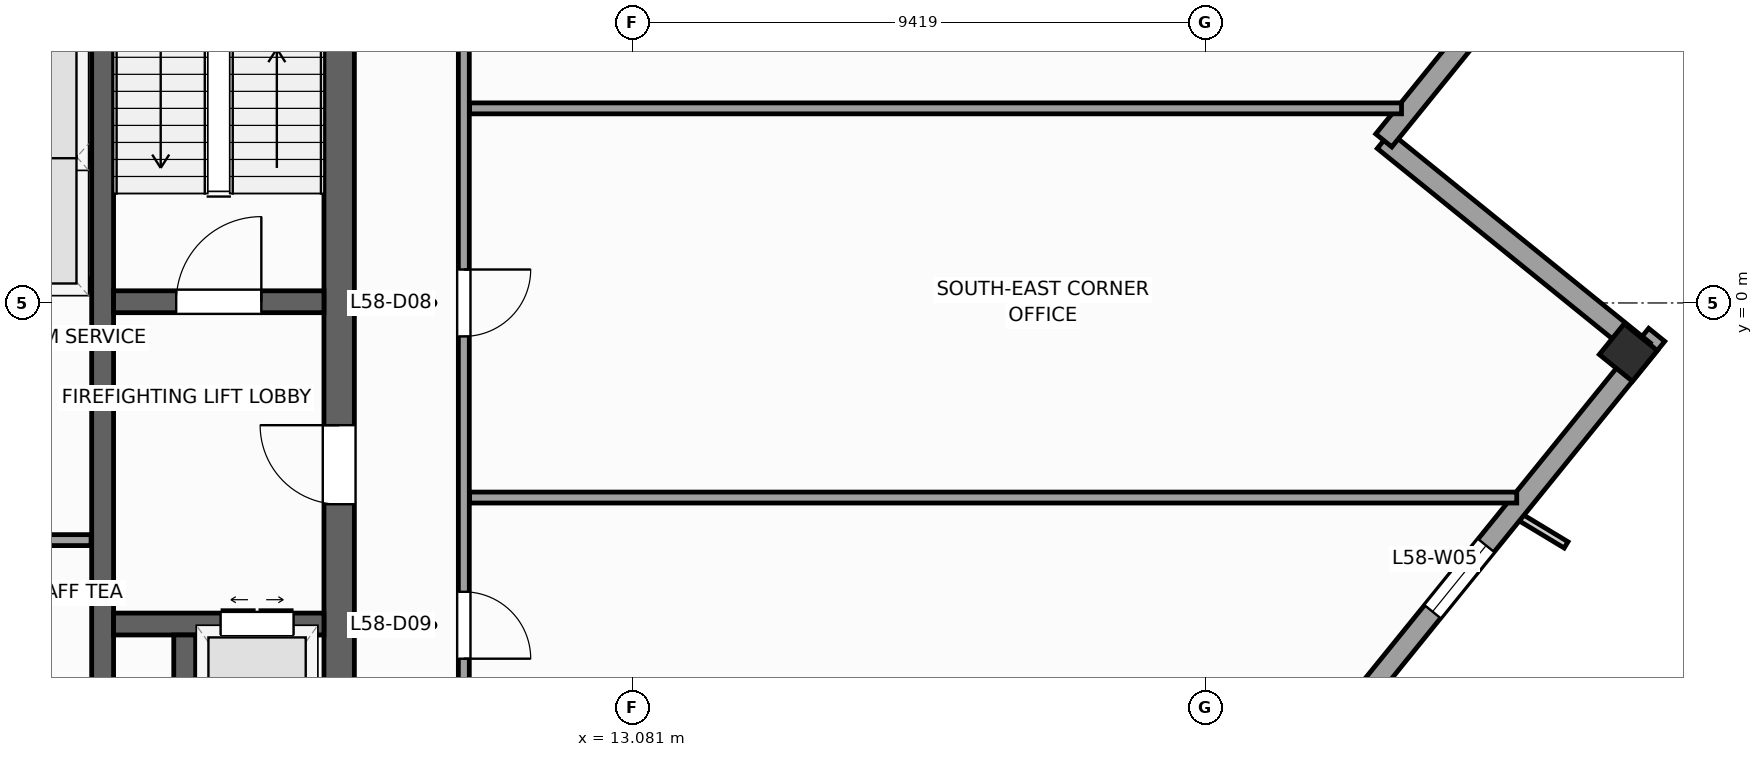
"""IFC4 building model, lengths in metres.
Left out: names, types, materials, properties, quantities, classifications, styles, units other than length and angle.
Written with IfcOpenShell. Run it as: python <this file> out.ifc"""

import sys

from ifc_helpers import new_model, si_unit, direction, frame, frame_2d, origin, origin_2d, place, context, subcontext, project, spatial, rectangle, extrude, source, transform, mapped, element, fill, save


model = new_model("IFC4")
c1 = context("Model", 3, precision=1e-05, world=origin(), true_north=direction((0.0, 1.0)))
c2 = subcontext(c1, "Body", "Model", "MODEL_VIEW")
j1 = project(units=[si_unit("LENGTHUNIT", "METRE"), si_unit("PLANEANGLEUNIT", "RADIAN")], contexts=[c1])
p1 = place(None, origin())
s1 = spatial("IfcSite", under=j1, at=p1, CompositionType="ELEMENT")
p2 = place(p1, origin())
s2 = spatial("IfcBuilding", under=s1, at=p2, CompositionType="ELEMENT")
p3 = place(p2, frame((0.0, 0.0, 240.7)))
s3 = spatial("IfcBuildingStorey", under=s2, at=p3, CompositionType="ELEMENT", Elevation=240.7)
p4 = place(p3, frame((8.25, -8.0, 0.0), z_axis=(0.0, 0.0, 1.0), x_axis=(0.0, 1.0, 0.0)))
e1 = element("IfcWall", 1, at=p4, inside=s3, PredefinedType="SHEAR", context=c2, shape_type="SweptSolid", body=[
    extrude(rectangle(XDim=16.0, YDim=0.5, at=frame_2d((8.0, 0.0))), origin(), (0.0, 0.0, 1.0), 3.9),
])
p5 = place(p4, frame((4.69, 0.0, 0.0)))
e2 = element("IfcOpeningElement", 2, at=p5, cuts=e1, PredefinedType="OPENING", context=c2, shape_type="SweptSolid", body=[
    extrude(rectangle(XDim=1.3, YDim=2.2, at=frame_2d((0.65, 1.1))), frame((0.0, 0.26, 0.0), z_axis=(0.0, -1.0, 0.0), x_axis=(1.0, 0.0, 0.0)), (0.0, 0.0, 1.0), 0.52),
])
p6 = place(p3, frame((4.36, -8.0, 0.0), z_axis=(0.0, 0.0, 1.0), x_axis=(0.0, 1.0, 0.0)))
e3 = element("IfcWall", 3, at=p6, inside=s3, PredefinedType="SHEAR", context=c2, shape_type="SweptSolid", body=[
    extrude(rectangle(XDim=16.0, YDim=0.36, at=frame_2d((8.0, 0.0))), origin(), (0.0, 0.0, 1.0), 3.9),
])
p7 = place(p3, frame((4.54, 0.02, 0.0), z_axis=(0.0, 0.0, 1.0), x_axis=(1.0, 0.0, 0.0)))
e4 = element("IfcWall", 4, at=p7, inside=s3, PredefinedType="SHEAR", context=c2, shape_type="SweptSolid", body=[
    extrude(rectangle(XDim=3.46, YDim=0.36, at=frame_2d((1.73, 0.0))), origin(), (0.0, 0.0, 1.0), 3.9),
])
p8 = place(p7, frame((1.03, 0.0, 0.0)))
e5 = element("IfcOpeningElement", 5, at=p8, cuts=e4, PredefinedType="OPENING", context=c2, shape_type="SweptSolid", body=[
    extrude(rectangle(XDim=1.4, YDim=2.2, at=frame_2d((0.7, 1.1))), frame((0.0, 0.19, 0.0), z_axis=(0.0, -1.0, 0.0), x_axis=(1.0, 0.0, 0.0)), (0.0, 0.0, 1.0), 0.38),
])
p9 = place(p3, frame((4.54, -5.28, 0.0), z_axis=(0.0, 0.0, 1.0), x_axis=(1.0, 0.0, 0.0)))
e6 = element("IfcWall", 6, at=p9, inside=s3, PredefinedType="SHEAR", context=c2, shape_type="SweptSolid", body=[
    extrude(rectangle(XDim=3.46, YDim=0.36, at=frame_2d((1.73, 0.0))), origin(), (0.0, 0.0, 1.0), 3.9),
])
p10 = place(p9, frame((1.76, 0.0, 0.0)))
e7 = element("IfcOpeningElement", 7, at=p10, cuts=e6, PredefinedType="OPENING", context=c2, shape_type="SweptSolid", body=[
    extrude(rectangle(XDim=1.2, YDim=2.25, at=frame_2d((0.6, 1.125))), frame((0.0, 0.19, 0.0), z_axis=(0.0, -1.0, 0.0), x_axis=(1.0, 0.0, 0.0)), (0.0, 0.0, 1.0), 0.38),
])
p11 = place(p3, frame((5.71, -8.0, 0.0), z_axis=(0.0, 0.0, 1.0), x_axis=(0.0, 1.0, 0.0)))
e8 = element("IfcWall", 8, at=p11, inside=s3, PredefinedType="SHEAR", context=c2, shape_type="SweptSolid", body=[
    extrude(rectangle(XDim=2.54, YDim=0.36, at=frame_2d((1.27, 0.0))), origin(), (0.0, 0.0, 1.0), 3.9),
])
m1 = source(origin(), c2, "Body", "SweptSolid", [
    extrude(rectangle(XDim=0.65, YDim=0.7, at=origin_2d()), origin(), (0.0, 0.0, 1.0), 3.9),
])
p12 = place(p3, frame((29.45, -0.815, 0.0), z_axis=(0.0, 0.0, 1.0), x_axis=(0.62932039105, 0.777145961457, 0.0)))
e9 = element("IfcColumn", 9, at=p12, inside=s3, PredefinedType="COLUMN", context=c2, shape_type="MappedRepresentation", body=[
    mapped(m1, transform((0.0, 0.0, 0.0), scale=1.0)),
])
p13 = place(p3, frame((6.733, -29.154, 0.0), z_axis=(0.0, 0.0, 1.0), x_axis=(0.629325378072, 0.77714192302, 0.0)))
e10 = element("IfcWall", 10, at=p13, inside=s3, PredefinedType="STANDARD", context=c2, shape_type="SweptSolid", body=[
    extrude(rectangle(XDim=36.84, YDim=0.34, at=frame_2d((18.42, 0.0))), origin(), (0.0, 0.0, 1.0), 2.96),
])
p14 = place(p13, frame((3.721, 0.0, 0.48)))
e11 = element("IfcOpeningElement", 11, at=p14, cuts=e10, PredefinedType="OPENING", context=c2, shape_type="SweptSolid", body=[
    extrude(rectangle(XDim=1.4, YDim=2.4, at=frame_2d((0.7, 1.2))), frame((0.0, 0.18, 0.0), z_axis=(0.0, -1.0, 0.0), x_axis=(1.0, 0.0, 0.0)), (0.0, 0.0, 1.0), 0.36),
])
p15 = place(p13, frame((10.559, 0.0, 0.58)))
e12 = element("IfcOpeningElement", 12, at=p15, cuts=e10, PredefinedType="OPENING", context=c2, shape_type="SweptSolid", body=[
    extrude(rectangle(XDim=1.75, YDim=2.3, at=frame_2d((0.875, 1.15))), frame((0.0, 0.18, 0.0), z_axis=(0.0, -1.0, 0.0), x_axis=(1.0, 0.0, 0.0)), (0.0, 0.0, 1.0), 0.36),
])
p16 = place(p13, frame((16.058, 0.0, 0.58)))
e13 = element("IfcOpeningElement", 13, at=p16, cuts=e10, PredefinedType="OPENING", context=c2, shape_type="SweptSolid", body=[
    extrude(rectangle(XDim=1.75, YDim=2.3, at=frame_2d((0.875, 1.15))), frame((0.0, 0.18, 0.0), z_axis=(0.0, -1.0, 0.0), x_axis=(1.0, 0.0, 0.0)), (0.0, 0.0, 1.0), 0.36),
])
p17 = place(p13, frame((24.176, 0.0, 0.58)))
e14 = element("IfcOpeningElement", 14, at=p17, cuts=e10, PredefinedType="OPENING", context=c2, shape_type="SweptSolid", body=[
    extrude(rectangle(XDim=1.75, YDim=2.3, at=frame_2d((0.875, 1.15))), frame((0.0, 0.18, 0.0), z_axis=(0.0, -1.0, 0.0), x_axis=(1.0, 0.0, 0.0)), (0.0, 0.0, 1.0), 0.36),
])
p18 = place(p13, frame((30.982, 0.0, 0.48)))
e15 = element("IfcOpeningElement", 15, at=p18, cuts=e10, PredefinedType="OPENING", context=c2, shape_type="SweptSolid", body=[
    extrude(rectangle(XDim=1.4, YDim=2.4, at=frame_2d((0.7, 1.2))), frame((0.0, 0.18, 0.0), z_axis=(0.0, -1.0, 0.0), x_axis=(1.0, 0.0, 0.0)), (0.0, 0.0, 1.0), 0.36),
])
p19 = place(p3, frame((29.703, -0.789, 0.0), z_axis=(0.0, 0.0, 1.0), x_axis=(-0.77714355312, 0.629323365087, 0.0)))
e16 = element("IfcWall", 16, at=p19, inside=s3, PredefinedType="STANDARD", context=c2, shape_type="SweptSolid", body=[
    extrude(rectangle(XDim=5.5, YDim=0.34, at=frame_2d((2.75, 0.0))), origin(), (0.0, 0.0, 1.0), 3.66),
])
p20 = place(p3, frame((25.429, 2.673, 0.0), z_axis=(0.0, 0.0, 1.0), x_axis=(0.629299794138, 0.777162640055, 0.0)))
e17 = element("IfcWall", 17, at=p20, inside=s3, PredefinedType="STANDARD", context=c2, shape_type="SweptSolid", body=[
    extrude(rectangle(XDim=5.67, YDim=0.34, at=frame_2d((2.835, 0.0))), origin(), (0.0, 0.0, 1.0), 3.66),
])
p21 = place(p20, frame((2.135, 0.0, 0.48)))
e18 = element("IfcOpeningElement", 18, at=p21, cuts=e17, PredefinedType="OPENING", context=c2, shape_type="SweptSolid", body=[
    extrude(rectangle(XDim=1.4, YDim=2.4, at=frame_2d((0.7, 1.2))), frame((0.0, 0.18, 0.0), z_axis=(0.0, -1.0, 0.0), x_axis=(1.0, 0.0, 0.0)), (0.0, 0.0, 1.0), 0.36),
])
for number, where, z_axis, x_axis in (
    (19, (1.89, -3.9, 0.0), (0.0, 0.0, 1.0), (1.0, 0.0, 0.0)),
    (20, (1.89, 0.3, 0.0), (0.0, 0.0, 1.0), (1.0, 0.0, 0.0)),
):
    element("IfcWall", number, at=place(p3, frame(where, z_axis=z_axis, x_axis=x_axis)), inside=s3, PredefinedType="PARTITIONING", context=c2, shape_type="SweptSolid", body=[
        extrude(rectangle(XDim=2.28, YDim=0.18, at=frame_2d((1.14, 0.0))), origin(), (0.0, 0.0, 1.0), 3.66),
    ])
p22 = place(p3, frame((1.9, 2.4, 0.0), z_axis=(0.0, 0.0, 1.0), x_axis=(1.0, 0.0, 0.0)))
e21 = element("IfcWall", 21, at=p22, inside=s3, PredefinedType="PARTITIONING", context=c2, shape_type="SweptSolid", body=[
    extrude(rectangle(XDim=2.26, YDim=0.12, at=frame_2d((1.13, 0.0))), origin(), (0.0, 0.0, 1.0), 3.66),
])
p23 = place(p3, frame((10.3, -10.2, 0.0), z_axis=(0.0, 0.0, 1.0), x_axis=(0.0, 1.0, 0.0)))
e22 = element("IfcWall", 22, at=p23, inside=s3, PredefinedType="PARTITIONING", context=c2, shape_type="SweptSolid", body=[
    extrude(rectangle(XDim=20.4, YDim=0.18, at=frame_2d((10.2, 0.0))), origin(), (0.0, 0.0, 1.0), 3.66),
])
p24 = place(p23, frame((14.95, 0.0, 0.0)))
e23 = element("IfcOpeningElement", 23, at=p24, cuts=e22, PredefinedType="OPENING", context=c2, shape_type="SweptSolid", body=[
    extrude(rectangle(XDim=1.1, YDim=2.2, at=frame_2d((0.55, 1.1))), frame((0.0, 0.1, 0.0), z_axis=(0.0, -1.0, 0.0), x_axis=(1.0, 0.0, 0.0)), (0.0, 0.0, 1.0), 0.2),
])
p25 = place(p23, frame((9.65, 0.0, 0.0)))
e24 = element("IfcOpeningElement", 24, at=p25, cuts=e22, PredefinedType="OPENING", context=c2, shape_type="SweptSolid", body=[
    extrude(rectangle(XDim=1.1, YDim=2.2, at=frame_2d((0.55, 1.1))), frame((0.0, 0.1, 0.0), z_axis=(0.0, -1.0, 0.0), x_axis=(1.0, 0.0, 0.0)), (0.0, 0.0, 1.0), 0.2),
])
p26 = place(p23, frame((4.35, 0.0, 0.0)))
e25 = element("IfcOpeningElement", 25, at=p26, cuts=e22, PredefinedType="OPENING", context=c2, shape_type="SweptSolid", body=[
    extrude(rectangle(XDim=1.1, YDim=2.2, at=frame_2d((0.55, 1.1))), frame((0.0, 0.1, 0.0), z_axis=(0.0, -1.0, 0.0), x_axis=(1.0, 0.0, 0.0)), (0.0, 0.0, 1.0), 0.2),
])
p27 = place(p3, frame((10.395, 3.2, 0.0), z_axis=(0.0, 0.0, 1.0), x_axis=(1.0, 0.0, 0.0)))
e26 = element("IfcWall", 26, at=p27, inside=s3, PredefinedType="PARTITIONING", context=c2, shape_type="SweptSolid", body=[
    extrude(rectangle(XDim=15.326, YDim=0.18, at=frame_2d((7.663, 0.0))), origin(), (0.0, 0.0, 1.0), 3.66),
])
p28 = place(p3, frame((10.395, -3.2, 0.0), z_axis=(0.0, 0.0, 1.0), x_axis=(1.0, 0.0, 0.0)))
e27 = element("IfcWall", 27, at=p28, inside=s3, PredefinedType="PARTITIONING", context=c2, shape_type="SweptSolid", body=[
    extrude(rectangle(XDim=17.22, YDim=0.18, at=frame_2d((8.61, 0.0))), origin(), (0.0, 0.0, 1.0), 3.66),
])
m2 = source(origin(), c2, "Body", "SweptSolid", [
    extrude(rectangle(XDim=1.4, YDim=2.4, at=frame_2d((0.7, 1.2))), frame((0.0, 0.03, 0.0), z_axis=(0.0, -1.0, 0.0), x_axis=(1.0, 0.0, 0.0)), (0.0, 0.0, 1.0), 0.06),
])
p29 = place(p18, origin())
e28 = element("IfcWindow", 28, at=p29, inside=s3, PartitioningType="SINGLE_PANEL", PredefinedType="WINDOW", context=c2, shape_type="MappedRepresentation", body=[
    mapped(m2, transform((0.0, 0.0, 0.0), scale=1.0)),
])
fill(e15, e28)
m3 = source(origin(), c2, "Body", "SweptSolid", [
    extrude(rectangle(XDim=1.4, YDim=2.2, at=frame_2d((0.7, 1.1))), frame((0.0, 0.025, 0.0), z_axis=(0.0, -1.0, 0.0), x_axis=(1.0, 0.0, 0.0)), (0.0, 0.0, 1.0), 0.05),
])
p30 = place(p8, origin())
e29 = element("IfcDoor", 29, at=p30, inside=s3, OperationType="SINGLE_SWING_RIGHT", PredefinedType="DOOR", context=c2, shape_type="MappedRepresentation", body=[
    mapped(m3, transform((0.0, 0.0, 0.0), scale=1.0)),
])
fill(e5, e29)
m4 = source(origin(), c2, "Body", "SweptSolid", [
    extrude(rectangle(XDim=1.3, YDim=2.2, at=frame_2d((0.65, 1.1))), frame((0.0, 0.025, 0.0), z_axis=(0.0, -1.0, 0.0), x_axis=(1.0, 0.0, 0.0)), (0.0, 0.0, 1.0), 0.05),
])
p31 = place(p5, origin())
e30 = element("IfcDoor", 30, at=p31, inside=s3, OperationType="SINGLE_SWING_RIGHT", PredefinedType="DOOR", context=c2, shape_type="MappedRepresentation", body=[
    mapped(m4, transform((0.0, 0.0, 0.0), scale=1.0)),
])
fill(e2, e30)
m5 = source(origin(), c2, "Body", "SweptSolid", [
    extrude(rectangle(XDim=1.2, YDim=2.25, at=frame_2d((0.6, 1.125))), frame((0.0, 0.025, 0.0), z_axis=(0.0, -1.0, 0.0), x_axis=(1.0, 0.0, 0.0)), (0.0, 0.0, 1.0), 0.05),
])
p32 = place(p10, origin())
e31 = element("IfcDoor", 31, at=p32, inside=s3, OperationType="DOUBLE_DOOR_SLIDING", PredefinedType="DOOR", context=c2, shape_type="MappedRepresentation", body=[
    mapped(m5, transform((0.0, 0.0, 0.0), scale=1.0)),
])
fill(e7, e31)
m6 = source(origin(), c2, "Body", "SweptSolid", [
    extrude(rectangle(XDim=1.1, YDim=2.2, at=frame_2d((0.55, 1.1))), frame((0.0, 0.025, 0.0), z_axis=(0.0, -1.0, 0.0), x_axis=(1.0, 0.0, 0.0)), (0.0, 0.0, 1.0), 0.05),
])
p33 = place(p25, frame((1.1, 0.0, 0.0), z_axis=(0.0, 0.0, 1.0), x_axis=(-1.0, 0.0, 0.0)))
e32 = element("IfcDoor", 32, at=p33, inside=s3, OperationType="SINGLE_SWING_RIGHT", PredefinedType="DOOR", context=c2, shape_type="MappedRepresentation", body=[
    mapped(m6, transform((0.0, 0.0, 0.0), scale=1.0)),
])
fill(e24, e32)
p34 = place(p26, frame((1.1, 0.0, 0.0), z_axis=(0.0, 0.0, 1.0), x_axis=(-1.0, 0.0, 0.0)))
e33 = element("IfcDoor", 33, at=p34, inside=s3, OperationType="SINGLE_SWING_LEFT", PredefinedType="DOOR", context=c2, shape_type="MappedRepresentation", body=[
    mapped(m6, transform((0.0, 0.0, 0.0), scale=1.0)),
])
fill(e25, e33)
save(model, sys.argv[1])
